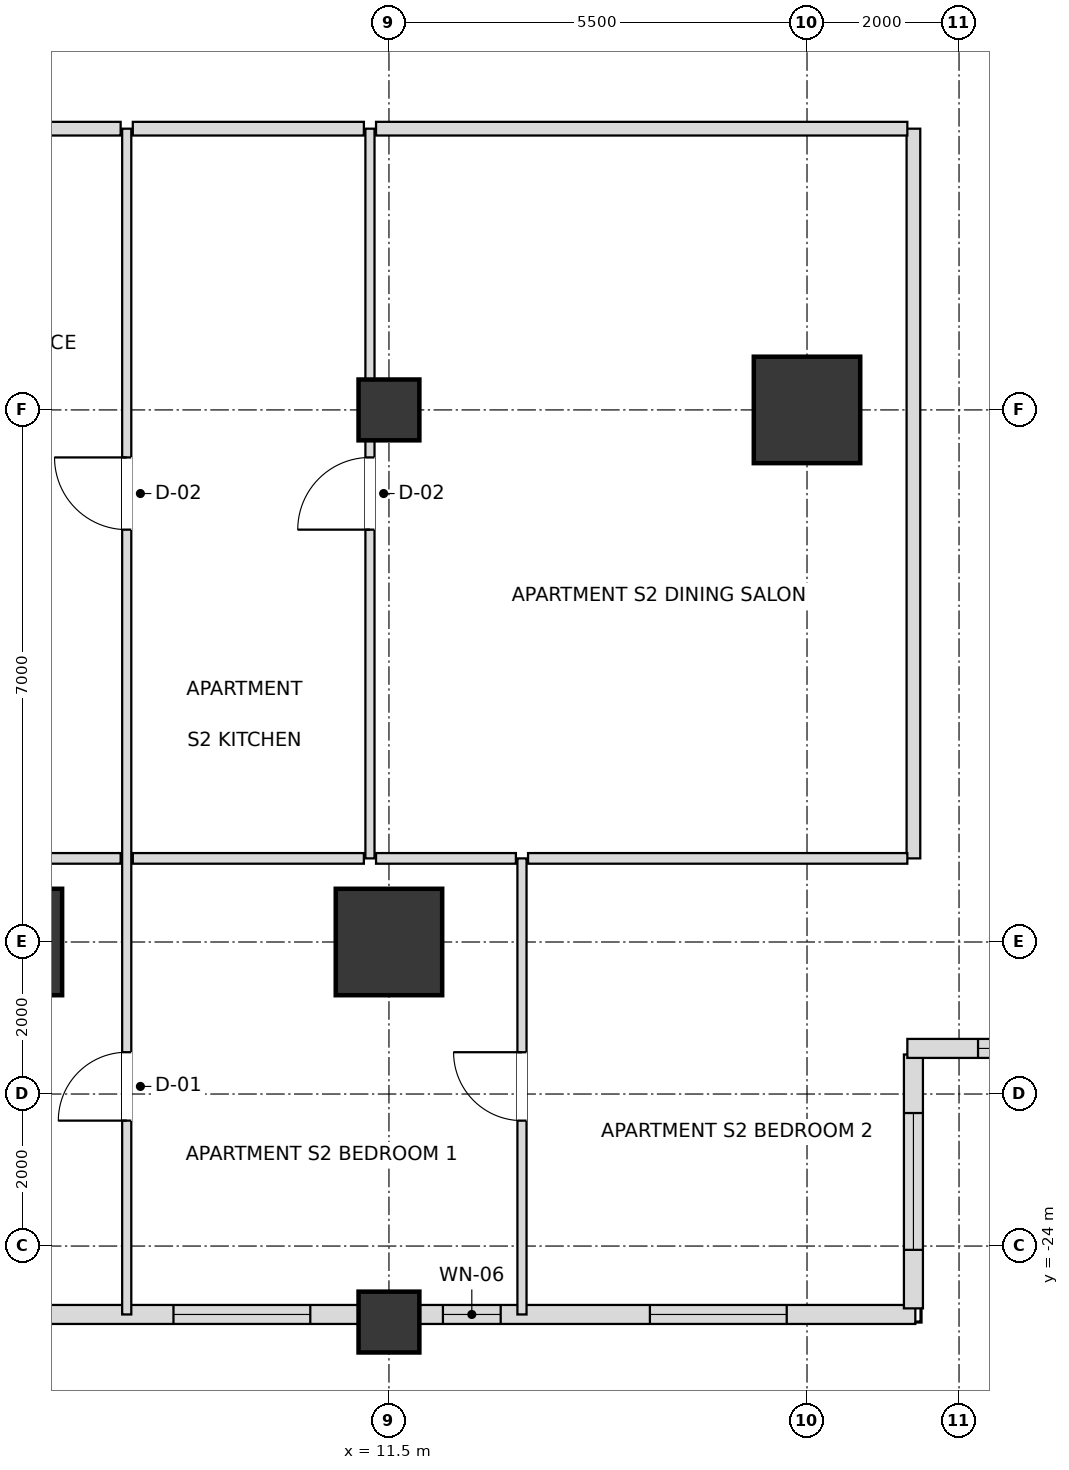
"""IFC4 building model, lengths in metres.
Left out: names, types, materials, properties, quantities, classifications, styles, units other than length and angle.
Written with IfcOpenShell. Run it as: python <this file> out.ifc"""

import sys

from ifc_helpers import new_model, si_unit, direction, frame, frame_2d, origin, origin_2d, place, context, subcontext, project, spatial, rectangle, extrude, element, fill, save


model = new_model("IFC4")
c1 = context("Model", 3, precision=1e-05, world=origin(), true_north=direction((0.0, 1.0)))
c2 = subcontext(c1, "Body", "Model", "MODEL_VIEW")
j1 = project(units=[si_unit("LENGTHUNIT", "METRE"), si_unit("PLANEANGLEUNIT", "RADIAN")], contexts=[c1])
p1 = place(None, origin())
s1 = spatial("IfcSite", under=j1, at=p1, CompositionType="ELEMENT")
p2 = place(p1, origin())
s2 = spatial("IfcBuilding", under=s1, at=p2, CompositionType="ELEMENT")
p3 = place(p2, frame((0.0, 0.0, 36.0)))
s3 = spatial("IfcBuildingStorey", under=s2, at=p3, CompositionType="ELEMENT", Elevation=36.0)
for number, where, z_axis, x_axis in (
    (1, (6.5, -20.0, 0.0), (0.0, 0.0, 1.0), (1.0, 0.0, 0.0)),
    (2, (11.5, -20.0, 0.0), (0.0, 0.0, 1.0), (1.0, 0.0, 0.0)),
    (3, (17.0, -13.0, 0.0), (0.0, 0.0, 1.0), (1.0, 0.0, 0.0)),
):
    element("IfcColumn", number, at=place(p3, frame(where, z_axis=z_axis, x_axis=x_axis)), inside=s3, PredefinedType="USERDEFINED", context=c2, shape_type="SweptSolid", body=[
        extrude(rectangle(XDim=1.4, YDim=1.4, at=origin_2d()), origin(), (0.0, 0.0, 1.0), 3.6),
    ])
for number, where, z_axis, x_axis in (
    (4, (11.5, -13.0, 0.0), (0.0, 0.0, 1.0), (1.0, 0.0, 0.0)),
    (5, (11.5, -25.0, 0.0), (0.0, 0.0, 1.0), (1.0, 0.0, 0.0)),
):
    element("IfcColumn", number, at=place(p3, frame(where, z_axis=z_axis, x_axis=x_axis)), inside=s3, PredefinedType="COLUMN", context=c2, shape_type="SweptSolid", body=[
        extrude(rectangle(XDim=0.8, YDim=0.8, at=origin_2d()), origin(), (0.0, 0.0, 1.0), 3.6),
    ])
p4 = place(p3, frame((6.895, -24.9, 0.0), z_axis=(0.0, 0.0, 1.0), x_axis=(1.0, 0.0, 0.0)))
e6 = element("IfcWall", 6, at=p4, inside=s3, PredefinedType="SOLIDWALL", context=c2, shape_type="SweptSolid", body=[
    extrude(rectangle(XDim=4.21, YDim=0.25, at=frame_2d((2.105, 0.0))), origin(), (0.0, 0.0, 1.0), 2.736),
])
p5 = place(p4, frame((1.77, 0.0, 0.72)))
e7 = element("IfcOpeningElement", 7, at=p5, cuts=e6, PredefinedType="OPENING", context=c2, shape_type="SweptSolid", body=[
    extrude(rectangle(XDim=1.8, YDim=1.68, at=frame_2d((0.9, 0.84))), frame((0.0, 0.135, 0.0), z_axis=(0.0, -1.0, 0.0), x_axis=(1.0, 0.0, 0.0)), (0.0, 0.0, 1.0), 0.27),
])
p6 = place(p3, frame((11.895, -24.9, 0.0), z_axis=(0.0, 0.0, 1.0), x_axis=(1.0, 0.0, 0.0)))
e8 = element("IfcWall", 8, at=p6, inside=s3, PredefinedType="SOLIDWALL", context=c2, shape_type="SweptSolid", body=[
    extrude(rectangle(XDim=6.53, YDim=0.25, at=frame_2d((3.265, 0.0))), origin(), (0.0, 0.0, 1.0), 2.736),
])
p7 = place(p6, frame((0.315, 0.0, 0.72)))
e9 = element("IfcOpeningElement", 9, at=p7, cuts=e8, PredefinedType="OPENING", context=c2, shape_type="SweptSolid", body=[
    extrude(rectangle(XDim=0.76, YDim=1.68, at=frame_2d((0.38, 0.84))), frame((0.0, 0.135, 0.0), z_axis=(0.0, -1.0, 0.0), x_axis=(1.0, 0.0, 0.0)), (0.0, 0.0, 1.0), 0.27),
])
p8 = place(p6, frame((3.038, 0.0, 0.72)))
e10 = element("IfcOpeningElement", 10, at=p8, cuts=e8, PredefinedType="OPENING", context=c2, shape_type="SweptSolid", body=[
    extrude(rectangle(XDim=1.8, YDim=1.68, at=frame_2d((0.9, 0.84))), frame((0.0, 0.135, 0.0), z_axis=(0.0, -1.0, 0.0), x_axis=(1.0, 0.0, 0.0)), (0.0, 0.0, 1.0), 0.27),
])
p9 = place(p3, frame((18.4, -24.82, 0.0), z_axis=(0.0, 0.0, 1.0), x_axis=(0.0, 1.0, 0.0)))
e11 = element("IfcWall", 11, at=p9, inside=s3, PredefinedType="SOLIDWALL", context=c2, shape_type="SweptSolid", body=[
    extrude(rectangle(XDim=3.34, YDim=0.25, at=frame_2d((1.67, 0.0))), origin(), (0.0, 0.0, 1.0), 2.736),
])
p10 = place(p9, frame((0.77, 0.0, 0.72)))
e12 = element("IfcOpeningElement", 12, at=p10, cuts=e11, PredefinedType="OPENING", context=c2, shape_type="SweptSolid", body=[
    extrude(rectangle(XDim=1.8, YDim=1.68, at=frame_2d((0.9, 0.84))), frame((0.0, 0.135, 0.0), z_axis=(0.0, -1.0, 0.0), x_axis=(1.0, 0.0, 0.0)), (0.0, 0.0, 1.0), 0.27),
])
p11 = place(p3, frame((18.32, -21.4, 0.0), z_axis=(0.0, 0.0, 1.0), x_axis=(1.0, 0.0, 0.0)))
e13 = element("IfcWall", 13, at=p11, inside=s3, PredefinedType="SOLIDWALL", context=c2, shape_type="SweptSolid", body=[
    extrude(rectangle(XDim=3.66, YDim=0.25, at=frame_2d((1.83, 0.0))), origin(), (0.0, 0.0, 1.0), 2.736),
])
p12 = place(p11, frame((0.93, 0.0, 0.72)))
e14 = element("IfcOpeningElement", 14, at=p12, cuts=e13, PredefinedType="OPENING", context=c2, shape_type="SweptSolid", body=[
    extrude(rectangle(XDim=1.8, YDim=1.68, at=frame_2d((0.9, 0.84))), frame((0.0, 0.135, 0.0), z_axis=(0.0, -1.0, 0.0), x_axis=(1.0, 0.0, 0.0)), (0.0, 0.0, 1.0), 0.27),
])
p13 = place(p3, frame((8.05, -24.9, 0.0), z_axis=(0.0, 0.0, 1.0), x_axis=(0.0, 1.0, 0.0)))
e15 = element("IfcWall", 15, at=p13, inside=s3, PredefinedType="PARTITIONING", context=c2, shape_type="SweptSolid", body=[
    extrude(rectangle(XDim=15.6, YDim=0.12, at=frame_2d((7.8, 0.0))), origin(), (0.0, 0.0, 1.0), 2.816),
])
p14 = place(p13, frame((10.325, 0.0, 0.0)))
e16 = element("IfcOpeningElement", 16, at=p14, cuts=e15, PredefinedType="OPENING", context=c2, shape_type="SweptSolid", body=[
    extrude(rectangle(XDim=0.95, YDim=2.1, at=frame_2d((0.475, 1.05))), frame((0.0, 0.07, 0.0), z_axis=(0.0, -1.0, 0.0), x_axis=(1.0, 0.0, 0.0)), (0.0, 0.0, 1.0), 0.14),
])
p15 = place(p13, frame((2.55, 0.0, 0.0)))
e17 = element("IfcOpeningElement", 17, at=p15, cuts=e15, PredefinedType="OPENING", context=c2, shape_type="SweptSolid", body=[
    extrude(rectangle(XDim=0.9, YDim=2.1, at=frame_2d((0.45, 1.05))), frame((0.0, 0.07, 0.0), z_axis=(0.0, -1.0, 0.0), x_axis=(1.0, 0.0, 0.0)), (0.0, 0.0, 1.0), 0.14),
])
p16 = place(p3, frame((11.25, -18.9, 0.0), z_axis=(0.0, 0.0, 1.0), x_axis=(0.0, 1.0, 0.0)))
e18 = element("IfcWall", 18, at=p16, inside=s3, PredefinedType="PARTITIONING", context=c2, shape_type="SweptSolid", body=[
    extrude(rectangle(XDim=9.6, YDim=0.12, at=frame_2d((4.8, 0.0))), origin(), (0.0, 0.0, 1.0), 2.736),
])
p17 = place(p16, frame((4.325, 0.0, 0.0)))
e19 = element("IfcOpeningElement", 19, at=p17, cuts=e18, PredefinedType="OPENING", context=c2, shape_type="SweptSolid", body=[
    extrude(rectangle(XDim=0.95, YDim=2.1, at=frame_2d((0.475, 1.05))), frame((0.0, 0.07, 0.0), z_axis=(0.0, -1.0, 0.0), x_axis=(1.0, 0.0, 0.0)), (0.0, 0.0, 1.0), 0.14),
])
p18 = place(p3, frame((13.25, -24.9, 0.0), z_axis=(0.0, 0.0, 1.0), x_axis=(0.0, 1.0, 0.0)))
e20 = element("IfcWall", 20, at=p18, inside=s3, PredefinedType="PARTITIONING", context=c2, shape_type="SweptSolid", body=[
    extrude(rectangle(XDim=6.0, YDim=0.12, at=frame_2d((3.0, 0.0))), origin(), (0.0, 0.0, 1.0), 2.736),
])
p19 = place(p18, frame((2.55, 0.0, 0.0)))
e21 = element("IfcOpeningElement", 21, at=p19, cuts=e20, PredefinedType="OPENING", context=c2, shape_type="SweptSolid", body=[
    extrude(rectangle(XDim=0.9, YDim=2.1, at=frame_2d((0.45, 1.05))), frame((0.0, 0.07, 0.0), z_axis=(0.0, -1.0, 0.0), x_axis=(1.0, 0.0, 0.0)), (0.0, 0.0, 1.0), 0.14),
])
p20 = place(p3, frame((18.4, -18.9, 0.0), z_axis=(0.0, 0.0, 1.0), x_axis=(0.0, 1.0, 0.0)))
e22 = element("IfcWall", 22, at=p20, inside=s3, PredefinedType="PARTITIONING", context=c2, shape_type="SweptSolid", body=[
    extrude(rectangle(XDim=9.6, YDim=0.18, at=frame_2d((4.8, 0.0))), origin(), (0.0, 0.0, 1.0), 2.736),
])
p21 = place(p3, frame((3.93, -18.9, 0.0), z_axis=(0.0, 0.0, 1.0), x_axis=(1.0, 0.0, 0.0)))
e23 = element("IfcWall", 23, at=p21, inside=s3, PredefinedType="PARTITIONING", context=c2, shape_type="SweptSolid", body=[
    extrude(rectangle(XDim=4.04, YDim=0.14, at=frame_2d((2.02, 0.0))), origin(), (0.0, 0.0, 1.0), 2.816),
])
p22 = place(p21, frame((0.638, 0.0, 0.0)))
e24 = element("IfcOpeningElement", 24, at=p22, cuts=e23, PredefinedType="OPENING", context=c2, shape_type="SweptSolid", body=[
    extrude(rectangle(XDim=0.95, YDim=2.1, at=frame_2d((0.475, 1.05))), frame((0.0, 0.08, 0.0), z_axis=(0.0, -1.0, 0.0), x_axis=(1.0, 0.0, 0.0)), (0.0, 0.0, 1.0), 0.16),
])
p23 = place(p3, frame((8.13, -18.9, 0.0), z_axis=(0.0, 0.0, 1.0), x_axis=(1.0, 0.0, 0.0)))
e25 = element("IfcWall", 25, at=p23, inside=s3, PredefinedType="PARTITIONING", context=c2, shape_type="SweptSolid", body=[
    extrude(rectangle(XDim=3.04, YDim=0.14, at=frame_2d((1.52, 0.0))), origin(), (0.0, 0.0, 1.0), 3.38),
])
p24 = place(p3, frame((11.33, -18.9, 0.0), z_axis=(0.0, 0.0, 1.0), x_axis=(1.0, 0.0, 0.0)))
e26 = element("IfcWall", 26, at=p24, inside=s3, PredefinedType="PARTITIONING", context=c2, shape_type="SweptSolid", body=[
    extrude(rectangle(XDim=1.84, YDim=0.14, at=frame_2d((0.92, 0.0))), origin(), (0.0, 0.0, 1.0), 2.736),
])
p25 = place(p3, frame((13.33, -18.9, 0.0), z_axis=(0.0, 0.0, 1.0), x_axis=(1.0, 0.0, 0.0)))
e27 = element("IfcWall", 27, at=p25, inside=s3, PredefinedType="PARTITIONING", context=c2, shape_type="SweptSolid", body=[
    extrude(rectangle(XDim=4.99, YDim=0.14, at=frame_2d((2.495, 0.0))), origin(), (0.0, 0.0, 1.0), 2.736),
])
p26 = place(p3, frame((3.93, -9.3, 0.0), z_axis=(0.0, 0.0, 1.0), x_axis=(1.0, 0.0, 0.0)))
e28 = element("IfcWall", 28, at=p26, inside=s3, PredefinedType="PARTITIONING", context=c2, shape_type="SweptSolid", body=[
    extrude(rectangle(XDim=4.04, YDim=0.18, at=frame_2d((2.02, 0.0))), origin(), (0.0, 0.0, 1.0), 2.816),
])
p27 = place(p26, frame((1.565, 0.0, 0.0)))
e29 = element("IfcOpeningElement", 29, at=p27, cuts=e28, PredefinedType="OPENING", context=c2, shape_type="SweptSolid", body=[
    extrude(rectangle(XDim=0.95, YDim=2.15, at=frame_2d((0.475, 1.075))), frame((0.0, 0.1, 0.0), z_axis=(0.0, -1.0, 0.0), x_axis=(1.0, 0.0, 0.0)), (0.0, 0.0, 1.0), 0.2),
])
p28 = place(p3, frame((8.13, -9.3, 0.0), z_axis=(0.0, 0.0, 1.0), x_axis=(1.0, 0.0, 0.0)))
e30 = element("IfcWall", 30, at=p28, inside=s3, PredefinedType="PARTITIONING", context=c2, shape_type="SweptSolid", body=[
    extrude(rectangle(XDim=3.04, YDim=0.18, at=frame_2d((1.52, 0.0))), origin(), (0.0, 0.0, 1.0), 3.38),
])
p29 = place(p3, frame((11.33, -9.3, 0.0), z_axis=(0.0, 0.0, 1.0), x_axis=(1.0, 0.0, 0.0)))
e31 = element("IfcWall", 31, at=p29, inside=s3, PredefinedType="PARTITIONING", context=c2, shape_type="SweptSolid", body=[
    extrude(rectangle(XDim=6.99, YDim=0.18, at=frame_2d((3.495, 0.0))), origin(), (0.0, 0.0, 1.0), 2.816),
])
p30 = place(p5, origin())
e32 = element("IfcWindow", 32, at=p30, inside=s3, PartitioningType="SINGLE_PANEL", PredefinedType="WINDOW", context=c2, shape_type="SweptSolid", body=[
    extrude(rectangle(XDim=1.8, YDim=1.68, at=frame_2d((0.9, 0.84))), frame((0.0, 0.03, 0.0), z_axis=(0.0, -1.0, 0.0), x_axis=(1.0, 0.0, 0.0)), (0.0, 0.0, 1.0), 0.06),
])
fill(e7, e32)
p31 = place(p7, origin())
e33 = element("IfcWindow", 33, at=p31, inside=s3, PartitioningType="SINGLE_PANEL", PredefinedType="WINDOW", context=c2, shape_type="SweptSolid", body=[
    extrude(rectangle(XDim=0.76, YDim=1.68, at=frame_2d((0.38, 0.84))), frame((0.0, 0.03, 0.0), z_axis=(0.0, -1.0, 0.0), x_axis=(1.0, 0.0, 0.0)), (0.0, 0.0, 1.0), 0.06),
])
fill(e9, e33)
p32 = place(p8, origin())
e34 = element("IfcWindow", 34, at=p32, inside=s3, PartitioningType="SINGLE_PANEL", PredefinedType="WINDOW", context=c2, shape_type="SweptSolid", body=[
    extrude(rectangle(XDim=1.8, YDim=1.68, at=frame_2d((0.9, 0.84))), frame((0.0, 0.03, 0.0), z_axis=(0.0, -1.0, 0.0), x_axis=(1.0, 0.0, 0.0)), (0.0, 0.0, 1.0), 0.06),
])
fill(e10, e34)
p33 = place(p10, origin())
e35 = element("IfcWindow", 35, at=p33, inside=s3, PartitioningType="SINGLE_PANEL", PredefinedType="WINDOW", context=c2, shape_type="SweptSolid", body=[
    extrude(rectangle(XDim=1.8, YDim=1.68, at=frame_2d((0.9, 0.84))), frame((0.0, 0.03, 0.0), z_axis=(0.0, -1.0, 0.0), x_axis=(1.0, 0.0, 0.0)), (0.0, 0.0, 1.0), 0.06),
])
fill(e12, e35)
p34 = place(p12, origin())
e36 = element("IfcWindow", 36, at=p34, inside=s3, PartitioningType="SINGLE_PANEL", PredefinedType="WINDOW", context=c2, shape_type="SweptSolid", body=[
    extrude(rectangle(XDim=1.8, YDim=1.68, at=frame_2d((0.9, 0.84))), frame((0.0, 0.03, 0.0), z_axis=(0.0, -1.0, 0.0), x_axis=(1.0, 0.0, 0.0)), (0.0, 0.0, 1.0), 0.06),
])
fill(e14, e36)
p35 = place(p14, origin())
e37 = element("IfcDoor", 37, at=p35, inside=s3, OperationType="SINGLE_SWING_RIGHT", PredefinedType="DOOR", context=c2, shape_type="SweptSolid", body=[
    extrude(rectangle(XDim=0.95, YDim=2.1, at=frame_2d((0.475, 1.05))), frame((0.0, 0.025, 0.0), z_axis=(0.0, -1.0, 0.0), x_axis=(1.0, 0.0, 0.0)), (0.0, 0.0, 1.0), 0.05),
])
fill(e16, e37)
p36 = place(p17, origin())
e38 = element("IfcDoor", 38, at=p36, inside=s3, OperationType="SINGLE_SWING_LEFT", PredefinedType="DOOR", context=c2, shape_type="SweptSolid", body=[
    extrude(rectangle(XDim=0.95, YDim=2.1, at=frame_2d((0.475, 1.05))), frame((0.0, 0.025, 0.0), z_axis=(0.0, -1.0, 0.0), x_axis=(1.0, 0.0, 0.0)), (0.0, 0.0, 1.0), 0.05),
])
fill(e19, e38)
p37 = place(p15, origin())
e39 = element("IfcDoor", 39, at=p37, inside=s3, OperationType="SINGLE_SWING_LEFT", PredefinedType="DOOR", context=c2, shape_type="SweptSolid", body=[
    extrude(rectangle(XDim=0.9, YDim=2.1, at=frame_2d((0.45, 1.05))), frame((0.0, 0.025, 0.0), z_axis=(0.0, -1.0, 0.0), x_axis=(1.0, 0.0, 0.0)), (0.0, 0.0, 1.0), 0.05),
])
fill(e17, e39)
p38 = place(p19, origin())
e40 = element("IfcDoor", 40, at=p38, inside=s3, OperationType="SINGLE_SWING_RIGHT", PredefinedType="DOOR", context=c2, shape_type="SweptSolid", body=[
    extrude(rectangle(XDim=0.9, YDim=2.1, at=frame_2d((0.45, 1.05))), frame((0.0, 0.025, 0.0), z_axis=(0.0, -1.0, 0.0), x_axis=(1.0, 0.0, 0.0)), (0.0, 0.0, 1.0), 0.05),
])
fill(e21, e40)
save(model, sys.argv[1])
